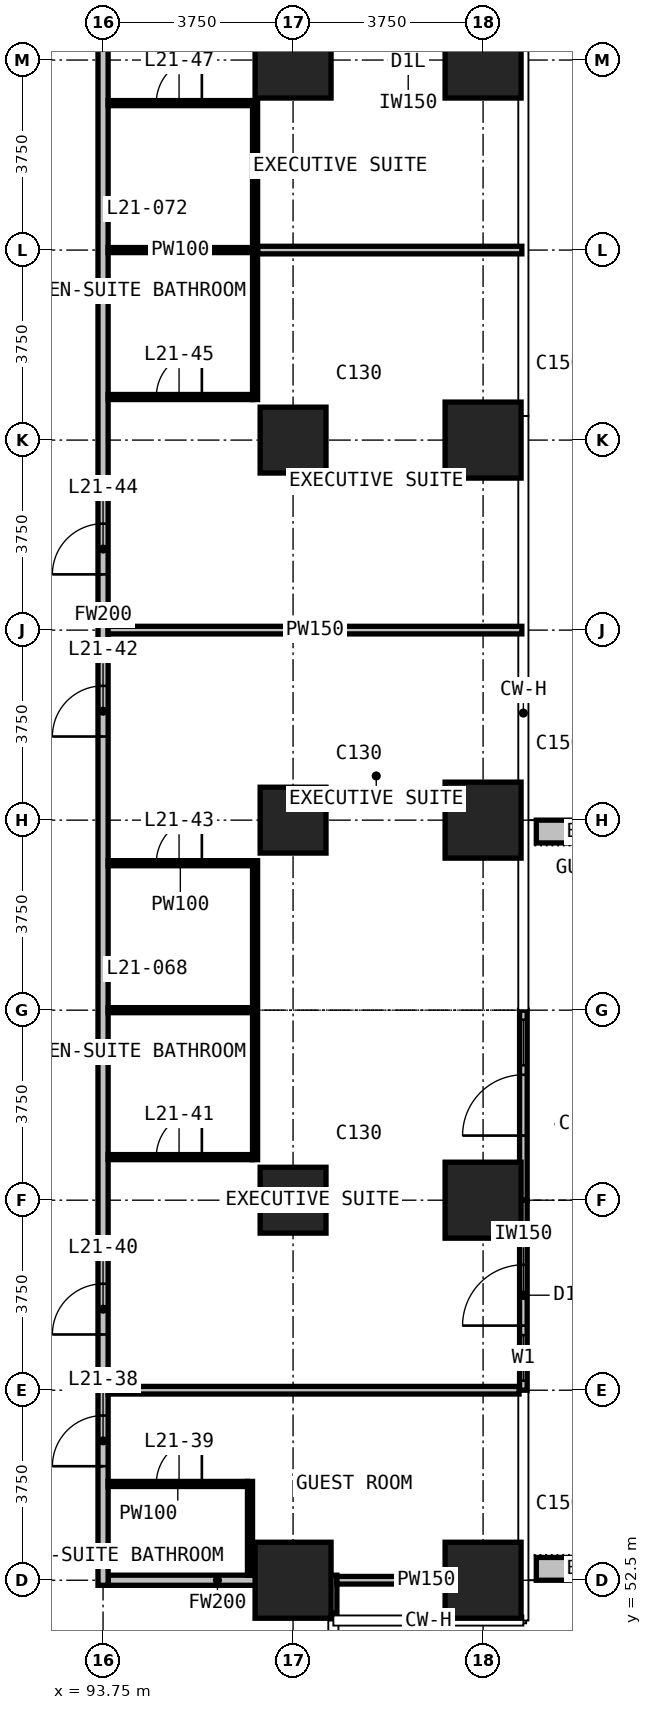
"""IFC4 building model, lengths in metres.
Left out: names, types, materials, properties, quantities, classifications, styles, units other than length and angle.
Written with IfcOpenShell. Run it as: python <this file> out.ifc"""

import sys

from ifc_helpers import new_model, si_unit, direction, frame, frame_2d, origin, origin_2d, place, context, subcontext, project, spatial, rectangle, extrude, element, fill, save


model = new_model("IFC4")
c1 = context("Model", 3, precision=1e-05, world=origin(), true_north=direction((0.0, 1.0)))
c2 = subcontext(c1, "Body", "Model", "MODEL_VIEW")
j1 = project(units=[si_unit("LENGTHUNIT", "METRE"), si_unit("PLANEANGLEUNIT", "RADIAN")], contexts=[c1])
p1 = place(None, origin())
s1 = spatial("IfcSite", under=j1, at=p1, CompositionType="ELEMENT")
p2 = place(p1, origin())
s2 = spatial("IfcBuilding", under=s1, at=p2, CompositionType="ELEMENT")
p3 = place(p2, frame((0.0, 0.0, 89.0)))
s3 = spatial("IfcBuildingStorey", under=s2, at=p3, CompositionType="ELEMENT", Elevation=89.0)
p4 = place(p3, frame((97.5, 52.5, 0.0), z_axis=(0.0, 0.0, 1.0), x_axis=(1.0, 0.0, 0.0)))
e1 = element("IfcColumn", 1, at=p4, inside=s3, PredefinedType="COLUMN", context=c2, shape_type="SweptSolid", body=[
    extrude(rectangle(XDim=1.5, YDim=1.5, at=origin_2d()), origin(), (0.0, 0.0, 1.0), 3.3),
])
for number, where, z_axis, x_axis in (
    (2, (97.5, 60.0, 0.0), (0.0, 0.0, 1.0), (1.0, 0.0, 0.0)),
    (3, (97.5, 67.5, 0.0), (0.0, 0.0, 1.0), (1.0, 0.0, 0.0)),
    (4, (97.5, 75.0, 0.0), (0.0, 0.0, 1.0), (1.0, 0.0, 0.0)),
):
    element("IfcColumn", number, at=place(p3, frame(where, z_axis=z_axis, x_axis=x_axis)), inside=s3, PredefinedType="COLUMN", context=c2, shape_type="SweptSolid", body=[
        extrude(rectangle(XDim=1.3, YDim=1.3, at=origin_2d()), origin(), (0.0, 0.0, 1.0), 3.3),
    ])
for number, where, z_axis, x_axis in (
    (5, (97.5, 82.5, 0.0), (0.0, 0.0, 1.0), (1.0, 0.0, 0.0)),
    (6, (101.25, 52.5, 0.0), (0.0, 0.0, 1.0), (1.0, 0.0, 0.0)),
    (7, (101.25, 60.0, 0.0), (0.0, 0.0, 1.0), (1.0, 0.0, 0.0)),
    (8, (101.25, 67.5, 0.0), (0.0, 0.0, 1.0), (1.0, 0.0, 0.0)),
    (9, (101.25, 75.0, 0.0), (0.0, 0.0, 1.0), (1.0, 0.0, 0.0)),
    (10, (101.25, 82.5, 0.0), (0.0, 0.0, 1.0), (1.0, 0.0, 0.0)),
):
    element("IfcColumn", number, at=place(p3, frame(where, z_axis=z_axis, x_axis=x_axis)), inside=s3, PredefinedType="COLUMN", context=c2, shape_type="SweptSolid", body=[
        extrude(rectangle(XDim=1.5, YDim=1.5, at=origin_2d()), origin(), (0.0, 0.0, 1.0), 3.3),
    ])
p5 = place(p3, frame((102.045, 56.25, 0.0), z_axis=(0.0, 0.0, 1.0), x_axis=(0.0, 1.0, 0.0)))
e11 = element("IfcWall", 11, at=p5, inside=s3, PredefinedType="SOLIDWALL", context=c2, shape_type="SweptSolid", body=[
    extrude(rectangle(XDim=3.75, YDim=0.15, at=frame_2d((1.875, 0.0))), origin(), (0.0, 0.0, 1.0), 3.0),
])
p6 = place(p5, frame((0.188, 0.0, 0.1)))
e12 = element("IfcOpeningElement", 12, at=p6, cuts=e11, PredefinedType="OPENING", context=c2, shape_type="SweptSolid", body=[
    extrude(rectangle(XDim=0.9, YDim=2.4, at=frame_2d((0.45, 1.2))), frame((0.0, 0.085, 0.0), z_axis=(0.0, -1.0, 0.0), x_axis=(1.0, 0.0, 0.0)), (0.0, 0.0, 1.0), 0.17),
])
p7 = place(p5, frame((1.275, 0.0, 0.0)))
e13 = element("IfcOpeningElement", 13, at=p7, cuts=e11, PredefinedType="OPENING", context=c2, shape_type="SweptSolid", body=[
    extrude(rectangle(XDim=1.2, YDim=2.4, at=frame_2d((0.6, 1.2))), frame((0.0, 0.085, 0.0), z_axis=(0.0, -1.0, 0.0), x_axis=(1.0, 0.0, 0.0)), (0.0, 0.0, 1.0), 0.17),
])
p8 = place(p3, frame((102.045, 60.0, 0.0), z_axis=(0.0, 0.0, 1.0), x_axis=(0.0, 1.0, 0.0)))
e14 = element("IfcWall", 14, at=p8, inside=s3, PredefinedType="SOLIDWALL", context=c2, shape_type="SweptSolid", body=[
    extrude(rectangle(XDim=3.75, YDim=0.15, at=frame_2d((1.875, 0.0))), origin(), (0.0, 0.0, 1.0), 3.0),
])
p9 = place(p8, frame((1.275, 0.0, 0.0)))
e15 = element("IfcOpeningElement", 15, at=p9, cuts=e14, PredefinedType="OPENING", context=c2, shape_type="SweptSolid", body=[
    extrude(rectangle(XDim=1.2, YDim=2.4, at=frame_2d((0.6, 1.2))), frame((0.0, 0.085, 0.0), z_axis=(0.0, -1.0, 0.0), x_axis=(1.0, 0.0, 0.0)), (0.0, 0.0, 1.0), 0.17),
])
p10 = place(p8, frame((2.663, 0.0, 0.1)))
e16 = element("IfcOpeningElement", 16, at=p10, cuts=e14, PredefinedType="OPENING", context=c2, shape_type="SweptSolid", body=[
    extrude(rectangle(XDim=0.9, YDim=2.4, at=frame_2d((0.45, 1.2))), frame((0.0, 0.085, 0.0), z_axis=(0.0, -1.0, 0.0), x_axis=(1.0, 0.0, 0.0)), (0.0, 0.0, 1.0), 0.17),
])
for number, where, z_axis, x_axis in (
    (17, (102.3, 52.725, 0.0), (0.0, 0.0, 1.0), (1.0, 0.0, 0.0)),
    (18, (102.3, 67.275, 0.0), (0.0, 0.0, 1.0), (1.0, 0.0, 0.0)),
):
    element("IfcWall", number, at=place(p3, frame(where, z_axis=z_axis, x_axis=x_axis)), inside=s3, PredefinedType="USERDEFINED", context=c2, shape_type="SweptSolid", body=[
        extrude(rectangle(XDim=2.35, YDim=0.45, at=frame_2d((1.175, 0.0))), origin(), (0.0, 0.0, 1.0), 1.1),
    ])
p11 = place(p3, frame((93.85, 52.5, 0.0), z_axis=(0.0, 0.0, 1.0), x_axis=(1.0, 0.0, 0.0)))
e19 = element("IfcWall", 19, at=p11, inside=s3, PredefinedType="PARTITIONING", context=c2, shape_type="SweptSolid", body=[
    extrude(rectangle(XDim=4.315, YDim=0.2, at=frame_2d((2.157, 0.0))), origin(), (0.0, 0.0, 1.0), 3.0),
])
p12 = place(p3, frame((93.75, 52.4, 0.0), z_axis=(0.0, 0.0, 1.0), x_axis=(0.0, 1.0, 0.0)))
e20 = element("IfcWall", 20, at=p12, inside=s3, PredefinedType="PARTITIONING", context=c2, shape_type="SweptSolid", body=[
    extrude(rectangle(XDim=38.31, YDim=0.2, at=frame_2d((19.155, 0.0))), origin(), (0.0, 0.0, 1.0), 3.0),
])
p13 = place(p12, frame((2.35, 0.0, 0.0)))
e21 = element("IfcOpeningElement", 21, at=p13, cuts=e20, PredefinedType="OPENING", context=c2, shape_type="SweptSolid", body=[
    extrude(rectangle(XDim=1.0, YDim=2.2, at=frame_2d((0.5, 1.1))), frame((0.0, 0.11, 0.0), z_axis=(0.0, -1.0, 0.0), x_axis=(1.0, 0.0, 0.0)), (0.0, 0.0, 1.0), 0.22),
])
p14 = place(p12, frame((4.95, 0.0, 0.0)))
e22 = element("IfcOpeningElement", 22, at=p14, cuts=e20, PredefinedType="OPENING", context=c2, shape_type="SweptSolid", body=[
    extrude(rectangle(XDim=1.0, YDim=2.2, at=frame_2d((0.5, 1.1))), frame((0.0, 0.11, 0.0), z_axis=(0.0, -1.0, 0.0), x_axis=(1.0, 0.0, 0.0)), (0.0, 0.0, 1.0), 0.22),
])
p15 = place(p12, frame((16.75, 0.0, 0.0)))
e23 = element("IfcOpeningElement", 23, at=p15, cuts=e20, PredefinedType="OPENING", context=c2, shape_type="SweptSolid", body=[
    extrude(rectangle(XDim=1.0, YDim=2.2, at=frame_2d((0.5, 1.1))), frame((0.0, 0.11, 0.0), z_axis=(0.0, -1.0, 0.0), x_axis=(1.0, 0.0, 0.0)), (0.0, 0.0, 1.0), 0.22),
])
p16 = place(p12, frame((19.95, 0.0, 0.0)))
e24 = element("IfcOpeningElement", 24, at=p16, cuts=e20, PredefinedType="OPENING", context=c2, shape_type="SweptSolid", body=[
    extrude(rectangle(XDim=1.0, YDim=2.2, at=frame_2d((0.5, 1.1))), frame((0.0, 0.11, 0.0), z_axis=(0.0, -1.0, 0.0), x_axis=(1.0, 0.0, 0.0)), (0.0, 0.0, 1.0), 0.22),
])
p17 = place(p12, frame((31.75, 0.0, 0.0)))
e25 = element("IfcOpeningElement", 25, at=p17, cuts=e20, PredefinedType="OPENING", context=c2, shape_type="SweptSolid", body=[
    extrude(rectangle(XDim=1.0, YDim=2.2, at=frame_2d((0.5, 1.1))), frame((0.0, 0.11, 0.0), z_axis=(0.0, -1.0, 0.0), x_axis=(1.0, 0.0, 0.0)), (0.0, 0.0, 1.0), 0.22),
])
p18 = place(p12, frame((35.65, 0.0, 0.0)))
e26 = element("IfcOpeningElement", 26, at=p18, cuts=e20, PredefinedType="OPENING", context=c2, shape_type="SweptSolid", body=[
    extrude(rectangle(XDim=0.9, YDim=2.2, at=frame_2d((0.45, 1.1))), frame((0.0, 0.11, 0.0), z_axis=(0.0, -1.0, 0.0), x_axis=(1.0, 0.0, 0.0)), (0.0, 0.0, 1.0), 0.22),
])
p19 = place(p3, frame((98.265, 51.855, 0.0), z_axis=(0.0, 0.0, 1.0), x_axis=(0.0, 1.0, 0.0)))
e27 = element("IfcWall", 27, at=p19, inside=s3, PredefinedType="PARTITIONING", context=c2, shape_type="SweptSolid", body=[
    extrude(rectangle(XDim=0.745, YDim=0.2, at=frame_2d((0.373, 0.0))), origin(), (0.0, 0.0, 1.0), 3.0),
])
p20 = place(p3, frame((98.365, 52.5, 0.0), z_axis=(0.0, 0.0, 1.0), x_axis=(1.0, 0.0, 0.0)))
e28 = element("IfcWall", 28, at=p20, inside=s3, PredefinedType="PARTITIONING", context=c2, shape_type="SweptSolid", body=[
    extrude(rectangle(XDim=3.53, YDim=0.15, at=frame_2d((1.765, 0.0))), origin(), (0.0, 0.0, 1.0), 3.0),
])
p21 = place(p3, frame((93.85, 56.25, 0.0), z_axis=(0.0, 0.0, 1.0), x_axis=(1.0, 0.0, 0.0)))
e29 = element("IfcWall", 29, at=p21, inside=s3, PredefinedType="PARTITIONING", context=c2, shape_type="SweptSolid", body=[
    extrude(rectangle(XDim=8.11, YDim=0.15, at=frame_2d((4.055, 0.0))), origin(), (0.0, 0.0, 1.0), 3.0),
])
p22 = place(p3, frame((93.85, 71.25, 0.0), z_axis=(0.0, 0.0, 1.0), x_axis=(1.0, 0.0, 0.0)))
e30 = element("IfcWall", 30, at=p22, inside=s3, PredefinedType="PARTITIONING", context=c2, shape_type="SweptSolid", body=[
    extrude(rectangle(XDim=8.165, YDim=0.15, at=frame_2d((4.083, 0.0))), origin(), (0.0, 0.0, 1.0), 3.0),
])
p23 = place(p3, frame((96.8, 78.75, 0.0), z_axis=(0.0, 0.0, 1.0), x_axis=(1.0, 0.0, 0.0)))
e31 = element("IfcWall", 31, at=p23, inside=s3, PredefinedType="PARTITIONING", context=c2, shape_type="SweptSolid", body=[
    extrude(rectangle(XDim=5.215, YDim=0.15, at=frame_2d((2.607, 0.0))), origin(), (0.0, 0.0, 1.0), 3.0),
])
p24 = place(p3, frame((93.85, 54.4, 0.0), z_axis=(0.0, 0.0, 1.0), x_axis=(1.0, 0.0, 0.0)))
e32 = element("IfcWall", 32, at=p24, inside=s3, PredefinedType="PARTITIONING", context=c2, shape_type="SweptSolid", body=[
    extrude(rectangle(XDim=2.75, YDim=0.1, at=frame_2d((1.375, 0.0))), origin(), (0.0, 0.0, 1.0), 3.0),
])
p25 = place(p24, frame((0.95, 0.0, 0.0)))
e33 = element("IfcOpeningElement", 33, at=p25, cuts=e32, PredefinedType="OPENING", context=c2, shape_type="SweptSolid", body=[
    extrude(rectangle(XDim=0.9, YDim=2.2, at=frame_2d((0.45, 1.1))), frame((0.0, 0.06, 0.0), z_axis=(0.0, -1.0, 0.0), x_axis=(1.0, 0.0, 0.0)), (0.0, 0.0, 1.0), 0.12),
])
p26 = place(p3, frame((93.85, 60.85, 0.0), z_axis=(0.0, 0.0, 1.0), x_axis=(1.0, 0.0, 0.0)))
e34 = element("IfcWall", 34, at=p26, inside=s3, PredefinedType="PARTITIONING", context=c2, shape_type="SweptSolid", body=[
    extrude(rectangle(XDim=2.85, YDim=0.1, at=frame_2d((1.425, 0.0))), origin(), (0.0, 0.0, 1.0), 3.0),
])
p27 = place(p26, frame((0.95, 0.0, 0.0)))
e35 = element("IfcOpeningElement", 35, at=p27, cuts=e34, PredefinedType="OPENING", context=c2, shape_type="SweptSolid", body=[
    extrude(rectangle(XDim=0.9, YDim=2.2, at=frame_2d((0.45, 1.1))), frame((0.0, 0.06, 0.0), z_axis=(0.0, -1.0, 0.0), x_axis=(1.0, 0.0, 0.0)), (0.0, 0.0, 1.0), 0.12),
])
p28 = place(p3, frame((93.85, 63.75, 0.0), z_axis=(0.0, 0.0, 1.0), x_axis=(1.0, 0.0, 0.0)))
e36 = element("IfcWall", 36, at=p28, inside=s3, PredefinedType="PARTITIONING", context=c2, shape_type="SweptSolid", body=[
    extrude(rectangle(XDim=2.85, YDim=0.1, at=frame_2d((1.425, 0.0))), origin(), (0.0, 0.0, 1.0), 3.0),
])
p29 = place(p3, frame((93.85, 66.65, 0.0), z_axis=(0.0, 0.0, 1.0), x_axis=(1.0, 0.0, 0.0)))
e37 = element("IfcWall", 37, at=p29, inside=s3, PredefinedType="PARTITIONING", context=c2, shape_type="SweptSolid", body=[
    extrude(rectangle(XDim=2.85, YDim=0.1, at=frame_2d((1.425, 0.0))), origin(), (0.0, 0.0, 1.0), 3.0),
])
p30 = place(p29, frame((0.95, 0.0, 0.0)))
e38 = element("IfcOpeningElement", 38, at=p30, cuts=e37, PredefinedType="OPENING", context=c2, shape_type="SweptSolid", body=[
    extrude(rectangle(XDim=0.9, YDim=2.2, at=frame_2d((0.45, 1.1))), frame((0.0, 0.06, 0.0), z_axis=(0.0, -1.0, 0.0), x_axis=(1.0, 0.0, 0.0)), (0.0, 0.0, 1.0), 0.12),
])
p31 = place(p3, frame((93.85, 75.85, 0.0), z_axis=(0.0, 0.0, 1.0), x_axis=(1.0, 0.0, 0.0)))
e39 = element("IfcWall", 39, at=p31, inside=s3, PredefinedType="PARTITIONING", context=c2, shape_type="SweptSolid", body=[
    extrude(rectangle(XDim=2.85, YDim=0.1, at=frame_2d((1.425, 0.0))), origin(), (0.0, 0.0, 1.0), 3.0),
])
p32 = place(p31, frame((0.95, 0.0, 0.0)))
e40 = element("IfcOpeningElement", 40, at=p32, cuts=e39, PredefinedType="OPENING", context=c2, shape_type="SweptSolid", body=[
    extrude(rectangle(XDim=0.9, YDim=2.2, at=frame_2d((0.45, 1.1))), frame((0.0, 0.06, 0.0), z_axis=(0.0, -1.0, 0.0), x_axis=(1.0, 0.0, 0.0)), (0.0, 0.0, 1.0), 0.12),
])
p33 = place(p3, frame((93.85, 78.75, 0.0), z_axis=(0.0, 0.0, 1.0), x_axis=(1.0, 0.0, 0.0)))
e41 = element("IfcWall", 41, at=p33, inside=s3, PredefinedType="PARTITIONING", context=c2, shape_type="SweptSolid", body=[
    extrude(rectangle(XDim=2.85, YDim=0.1, at=frame_2d((1.425, 0.0))), origin(), (0.0, 0.0, 1.0), 3.0),
])
p34 = place(p3, frame((93.85, 81.65, 0.0), z_axis=(0.0, 0.0, 1.0), x_axis=(1.0, 0.0, 0.0)))
e42 = element("IfcWall", 42, at=p34, inside=s3, PredefinedType="PARTITIONING", context=c2, shape_type="SweptSolid", body=[
    extrude(rectangle(XDim=2.85, YDim=0.1, at=frame_2d((1.425, 0.0))), origin(), (0.0, 0.0, 1.0), 3.0),
])
p35 = place(p34, frame((0.95, 0.0, 0.0)))
e43 = element("IfcOpeningElement", 43, at=p35, cuts=e42, PredefinedType="OPENING", context=c2, shape_type="SweptSolid", body=[
    extrude(rectangle(XDim=0.9, YDim=2.2, at=frame_2d((0.45, 1.1))), frame((0.0, 0.06, 0.0), z_axis=(0.0, -1.0, 0.0), x_axis=(1.0, 0.0, 0.0)), (0.0, 0.0, 1.0), 0.12),
])
p36 = place(p3, frame((96.65, 52.6, 0.0), z_axis=(0.0, 0.0, 1.0), x_axis=(0.0, 1.0, 0.0)))
e44 = element("IfcWall", 44, at=p36, inside=s3, PredefinedType="PARTITIONING", context=c2, shape_type="SweptSolid", body=[
    extrude(rectangle(XDim=1.85, YDim=0.1, at=frame_2d((0.925, 0.0))), origin(), (0.0, 0.0, 1.0), 3.0),
])
for number, where, z_axis, x_axis in (
    (45, (96.75, 60.8, 0.0), (0.0, 0.0, 1.0), (0.0, 1.0, 0.0)),
    (46, (96.75, 75.8, 0.0), (0.0, 0.0, 1.0), (0.0, 1.0, 0.0)),
):
    element("IfcWall", number, at=place(p3, frame(where, z_axis=z_axis, x_axis=x_axis)), inside=s3, PredefinedType="PARTITIONING", context=c2, shape_type="SweptSolid", body=[
        extrude(rectangle(XDim=5.9, YDim=0.1, at=frame_2d((2.95, 0.0))), origin(), (0.0, 0.0, 1.0), 3.0),
    ])
p37 = place(p6, origin())
e47 = element("IfcWindow", 47, at=p37, inside=s3, PartitioningType="SINGLE_PANEL", PredefinedType="WINDOW", context=c2, shape_type="SweptSolid", body=[
    extrude(rectangle(XDim=0.9, YDim=2.4, at=frame_2d((0.45, 1.2))), frame((0.0, 0.03, 0.0), z_axis=(0.0, -1.0, 0.0), x_axis=(1.0, 0.0, 0.0)), (0.0, 0.0, 1.0), 0.06),
])
fill(e12, e47)
p38 = place(p7, origin())
e48 = element("IfcDoor", 48, at=p38, inside=s3, OperationType="SINGLE_SWING_LEFT", PredefinedType="DOOR", context=c2, shape_type="SweptSolid", body=[
    extrude(rectangle(XDim=1.2, YDim=2.4, at=frame_2d((0.6, 1.2))), frame((0.0, 0.025, 0.0), z_axis=(0.0, -1.0, 0.0), x_axis=(1.0, 0.0, 0.0)), (0.0, 0.0, 1.0), 0.05),
])
fill(e13, e48)
p39 = place(p9, origin())
e49 = element("IfcDoor", 49, at=p39, inside=s3, OperationType="SINGLE_SWING_LEFT", PredefinedType="DOOR", context=c2, shape_type="SweptSolid", body=[
    extrude(rectangle(XDim=1.2, YDim=2.4, at=frame_2d((0.6, 1.2))), frame((0.0, 0.025, 0.0), z_axis=(0.0, -1.0, 0.0), x_axis=(1.0, 0.0, 0.0)), (0.0, 0.0, 1.0), 0.05),
])
fill(e15, e49)
p40 = place(p10, origin())
e50 = element("IfcWindow", 50, at=p40, inside=s3, PartitioningType="SINGLE_PANEL", PredefinedType="WINDOW", context=c2, shape_type="SweptSolid", body=[
    extrude(rectangle(XDim=0.9, YDim=2.4, at=frame_2d((0.45, 1.2))), frame((0.0, 0.03, 0.0), z_axis=(0.0, -1.0, 0.0), x_axis=(1.0, 0.0, 0.0)), (0.0, 0.0, 1.0), 0.06),
])
fill(e16, e50)
p41 = place(p13, origin())
e51 = element("IfcDoor", 51, at=p41, inside=s3, OperationType="SINGLE_SWING_LEFT", PredefinedType="DOOR", context=c2, shape_type="SweptSolid", body=[
    extrude(rectangle(XDim=1.0, YDim=2.2, at=frame_2d((0.5, 1.1))), frame((0.0, 0.025, 0.0), z_axis=(0.0, -1.0, 0.0), x_axis=(1.0, 0.0, 0.0)), (0.0, 0.0, 1.0), 0.05),
])
fill(e21, e51)
p42 = place(p25, origin())
e52 = element("IfcDoor", 52, at=p42, inside=s3, OperationType="SINGLE_SWING_RIGHT", PredefinedType="DOOR", context=c2, shape_type="SweptSolid", body=[
    extrude(rectangle(XDim=0.9, YDim=2.2, at=frame_2d((0.45, 1.1))), frame((0.0, 0.025, 0.0), z_axis=(0.0, -1.0, 0.0), x_axis=(1.0, 0.0, 0.0)), (0.0, 0.0, 1.0), 0.05),
])
fill(e33, e52)
p43 = place(p14, origin())
e53 = element("IfcDoor", 53, at=p43, inside=s3, OperationType="SINGLE_SWING_LEFT", PredefinedType="DOOR", context=c2, shape_type="SweptSolid", body=[
    extrude(rectangle(XDim=1.0, YDim=2.2, at=frame_2d((0.5, 1.1))), frame((0.0, 0.025, 0.0), z_axis=(0.0, -1.0, 0.0), x_axis=(1.0, 0.0, 0.0)), (0.0, 0.0, 1.0), 0.05),
])
fill(e22, e53)
p44 = place(p27, origin())
e54 = element("IfcDoor", 54, at=p44, inside=s3, OperationType="SINGLE_SWING_RIGHT", PredefinedType="DOOR", context=c2, shape_type="SweptSolid", body=[
    extrude(rectangle(XDim=0.9, YDim=2.2, at=frame_2d((0.45, 1.1))), frame((0.0, 0.025, 0.0), z_axis=(0.0, -1.0, 0.0), x_axis=(1.0, 0.0, 0.0)), (0.0, 0.0, 1.0), 0.05),
])
fill(e35, e54)
p45 = place(p15, origin())
e55 = element("IfcDoor", 55, at=p45, inside=s3, OperationType="SINGLE_SWING_RIGHT", PredefinedType="DOOR", context=c2, shape_type="SweptSolid", body=[
    extrude(rectangle(XDim=1.0, YDim=2.2, at=frame_2d((0.5, 1.1))), frame((0.0, 0.025, 0.0), z_axis=(0.0, -1.0, 0.0), x_axis=(1.0, 0.0, 0.0)), (0.0, 0.0, 1.0), 0.05),
])
fill(e23, e55)
p46 = place(p30, origin())
e56 = element("IfcDoor", 56, at=p46, inside=s3, OperationType="SINGLE_SWING_RIGHT", PredefinedType="DOOR", context=c2, shape_type="SweptSolid", body=[
    extrude(rectangle(XDim=0.9, YDim=2.2, at=frame_2d((0.45, 1.1))), frame((0.0, 0.025, 0.0), z_axis=(0.0, -1.0, 0.0), x_axis=(1.0, 0.0, 0.0)), (0.0, 0.0, 1.0), 0.05),
])
fill(e38, e56)
p47 = place(p16, origin())
e57 = element("IfcDoor", 57, at=p47, inside=s3, OperationType="SINGLE_SWING_RIGHT", PredefinedType="DOOR", context=c2, shape_type="SweptSolid", body=[
    extrude(rectangle(XDim=1.0, YDim=2.2, at=frame_2d((0.5, 1.1))), frame((0.0, 0.025, 0.0), z_axis=(0.0, -1.0, 0.0), x_axis=(1.0, 0.0, 0.0)), (0.0, 0.0, 1.0), 0.05),
])
fill(e24, e57)
p48 = place(p32, origin())
e58 = element("IfcDoor", 58, at=p48, inside=s3, OperationType="SINGLE_SWING_RIGHT", PredefinedType="DOOR", context=c2, shape_type="SweptSolid", body=[
    extrude(rectangle(XDim=0.9, YDim=2.2, at=frame_2d((0.45, 1.1))), frame((0.0, 0.025, 0.0), z_axis=(0.0, -1.0, 0.0), x_axis=(1.0, 0.0, 0.0)), (0.0, 0.0, 1.0), 0.05),
])
fill(e40, e58)
p49 = place(p35, origin())
e59 = element("IfcDoor", 59, at=p49, inside=s3, OperationType="SINGLE_SWING_RIGHT", PredefinedType="DOOR", context=c2, shape_type="SweptSolid", body=[
    extrude(rectangle(XDim=0.9, YDim=2.2, at=frame_2d((0.45, 1.1))), frame((0.0, 0.025, 0.0), z_axis=(0.0, -1.0, 0.0), x_axis=(1.0, 0.0, 0.0)), (0.0, 0.0, 1.0), 0.05),
])
fill(e43, e59)
save(model, sys.argv[1])
